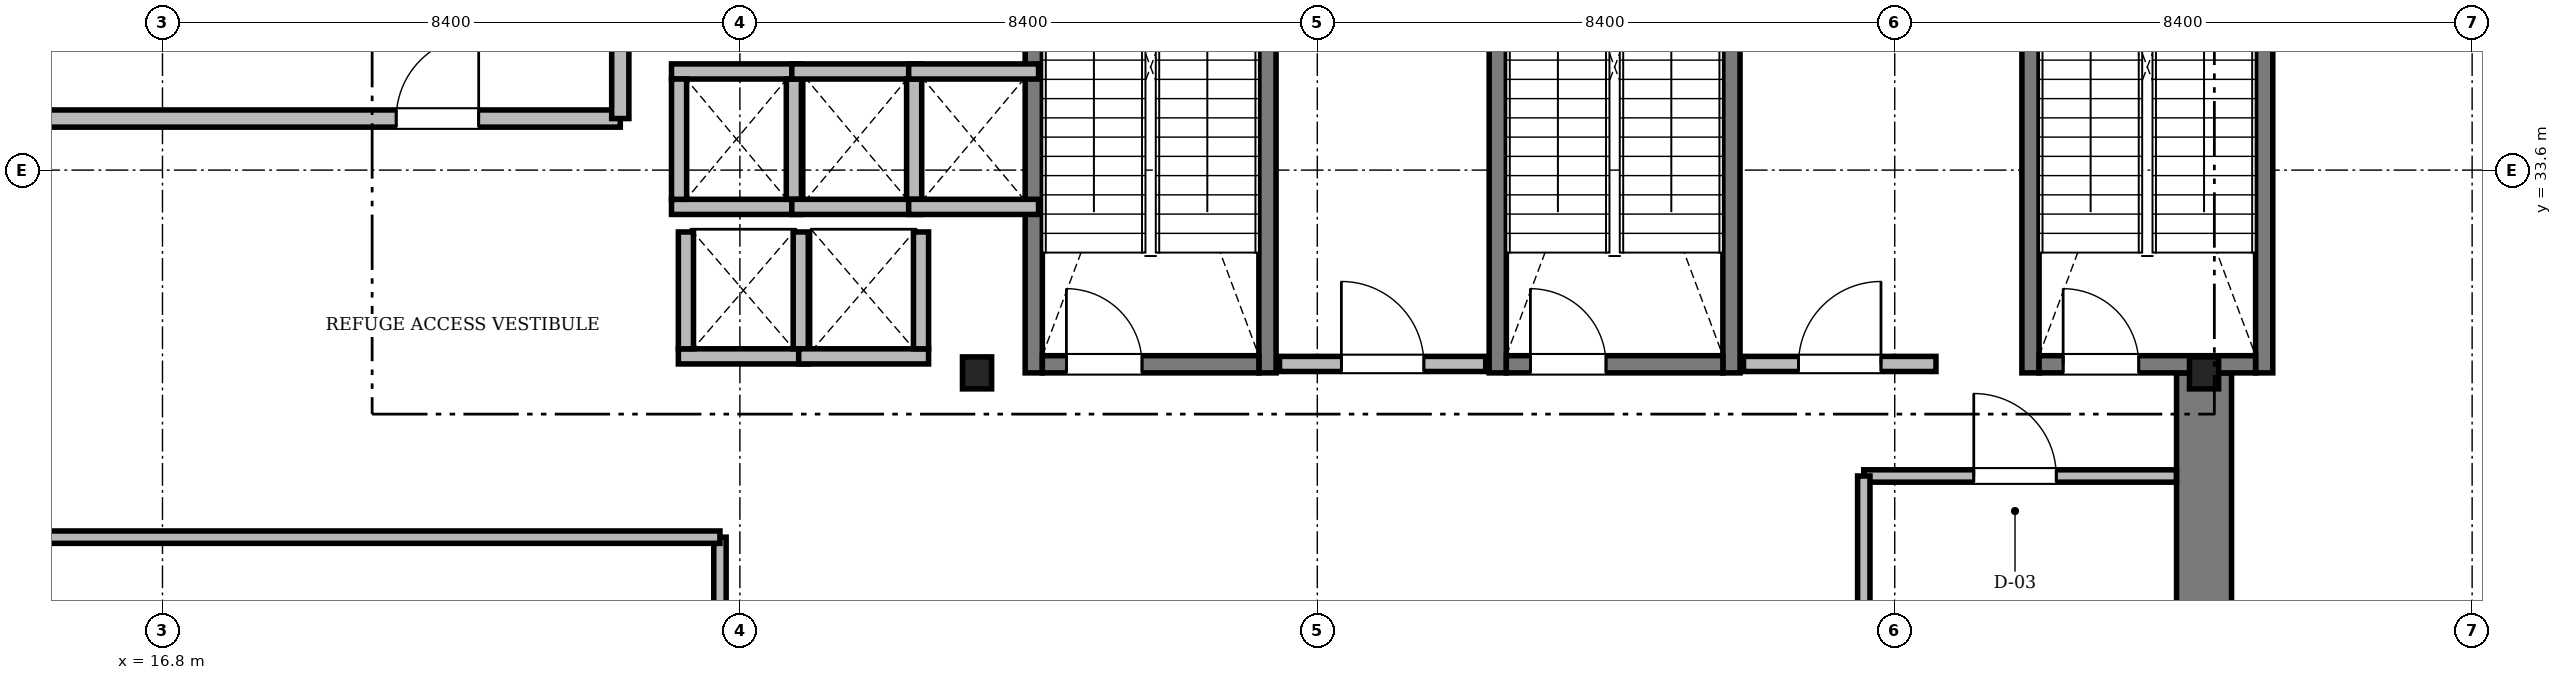
"""IFC4 building model, lengths in metres.
Left out: names, types, materials, properties, quantities, classifications, styles, units other than length and angle.
Written with IfcOpenShell. Run it as: python <this file> out.ifc"""

import sys

from ifc_helpers import new_model, si_unit, direction, frame, frame_2d, origin, origin_2d, place, context, subcontext, project, spatial, rectangle, i_section, extrude, source, transform, mapped, element, fill, save


model = new_model("IFC4")
c1 = context("Model", 3, precision=1e-05, world=origin(), true_north=direction((0.0, 1.0)))
c2 = subcontext(c1, "Body", "Model", "MODEL_VIEW")
j1 = project(units=[si_unit("LENGTHUNIT", "METRE"), si_unit("PLANEANGLEUNIT", "RADIAN")], contexts=[c1])
p1 = place(None, origin())
s1 = spatial("IfcSite", under=j1, at=p1, CompositionType="ELEMENT")
p2 = place(p1, origin())
s2 = spatial("IfcBuilding", under=s1, at=p2, CompositionType="ELEMENT")
p3 = place(p2, frame((0.0, 0.0, 166.8)))
s3 = spatial("IfcBuildingStorey", under=s2, at=p3, CompositionType="ELEMENT", Elevation=166.8)
m1 = source(origin(), c2, "Body", "SweptSolid", [
    extrude(rectangle(XDim=13.15, YDim=0.8, at=frame_2d((6.575, 0.0))), origin(), (0.0, 0.0, 1.0), 4.75),
])
p4 = place(p3, frame((46.5, 17.5, 0.0), z_axis=(0.0, 0.0, 1.0), x_axis=(0.0, 1.0, 0.0)))
e1 = element("IfcWall", 1, at=p4, inside=s3, PredefinedType="SHEAR", context=c2, shape_type="MappedRepresentation", body=[
    mapped(m1, transform((0.0, 0.0, 0.0), scale=1.0)),
])
m2 = source(origin(), c2, "Body", "SweptSolid", [
    extrude(i_section(OverallWidth=0.424, OverallDepth=0.465, WebThickness=0.035, FlangeThickness=0.056, FilletRadius=0.015, at=origin_2d()), origin(), (0.0, 0.0, 1.0), 4.75),
])
for number, where, z_axis, x_axis in (
    (2, (28.65, 30.65, 0.0), (0.0, 0.0, 1.0), (1.0, 0.0, 0.0)),
    (3, (46.5, 30.65, 0.0), (0.0, 0.0, 1.0), (1.0, 0.0, 0.0)),
):
    element("IfcColumn", number, at=place(p3, frame(where, z_axis=z_axis, x_axis=x_axis)), inside=s3, PredefinedType="COLUMN", context=c2, shape_type="MappedRepresentation", body=[
        mapped(m2, transform((0.0, 0.0, 0.0), scale=1.0)),
    ])
m3 = source(origin(), c2, "Body", "SweptSolid", [
    extrude(rectangle(XDim=9.25, YDim=0.25, at=frame_2d((4.625, 0.0))), origin(), (0.0, 0.0, 1.0), 5.2),
])
for number, where, z_axis, x_axis in (
    (4, (29.475, 30.65, 0.0), (0.0, 0.0, 1.0), (0.0, 1.0, 0.0)),
    (5, (32.875, 30.65, 0.0), (0.0, 0.0, 1.0), (0.0, 1.0, 0.0)),
):
    element("IfcWall", number, at=place(p3, frame(where, z_axis=z_axis, x_axis=x_axis)), inside=s3, PredefinedType="SOLIDWALL", context=c2, shape_type="MappedRepresentation", body=[
        mapped(m3, transform((0.0, 0.0, 0.0), scale=1.0)),
    ])
m4 = source(origin(), c2, "Body", "SweptSolid", [
    extrude(rectangle(XDim=3.15, YDim=0.25, at=frame_2d((1.575, 0.0))), origin(), (0.0, 0.0, 1.0), 5.2),
])
p5 = place(p3, frame((29.6, 30.775, 0.0), z_axis=(0.0, 0.0, 1.0), x_axis=(1.0, 0.0, 0.0)))
e6 = element("IfcWall", 6, at=p5, inside=s3, PredefinedType="SOLIDWALL", context=c2, shape_type="MappedRepresentation", body=[
    mapped(m4, transform((0.0, 0.0, 0.0), scale=1.0)),
])
m5 = source(origin(), c2, "Body", "SweptSolid", [
    extrude(rectangle(XDim=1.1, YDim=2.2, at=frame_2d((0.55, 1.1))), frame((0.0, 0.135, 0.0), z_axis=(0.0, -1.0, 0.0), x_axis=(1.0, 0.0, 0.0)), (0.0, 0.0, 1.0), 0.27),
])
p6 = place(p5, frame((0.35, 0.0, 0.0)))
e7 = element("IfcOpeningElement", 7, at=p6, cuts=e6, PredefinedType="OPENING", context=c2, shape_type="MappedRepresentation", body=[
    mapped(m5, transform((0.0, 0.0, 0.0), scale=1.0)),
])
for number, where, z_axis, x_axis in (
    (8, (36.225, 30.65, 0.0), (0.0, 0.0, 1.0), (0.0, 1.0, 0.0)),
    (9, (39.625, 30.65, 0.0), (0.0, 0.0, 1.0), (0.0, 1.0, 0.0)),
):
    element("IfcWall", number, at=place(p3, frame(where, z_axis=z_axis, x_axis=x_axis)), inside=s3, PredefinedType="SOLIDWALL", context=c2, shape_type="MappedRepresentation", body=[
        mapped(m3, transform((0.0, 0.0, 0.0), scale=1.0)),
    ])
p7 = place(p3, frame((36.35, 30.775, 0.0), z_axis=(0.0, 0.0, 1.0), x_axis=(1.0, 0.0, 0.0)))
e10 = element("IfcWall", 10, at=p7, inside=s3, PredefinedType="SOLIDWALL", context=c2, shape_type="MappedRepresentation", body=[
    mapped(m4, transform((0.0, 0.0, 0.0), scale=1.0)),
])
p8 = place(p7, frame((0.35, 0.0, 0.0)))
e11 = element("IfcOpeningElement", 11, at=p8, cuts=e10, PredefinedType="OPENING", context=c2, shape_type="MappedRepresentation", body=[
    mapped(m5, transform((0.0, 0.0, 0.0), scale=1.0)),
])
for number, where, z_axis, x_axis in (
    (12, (43.975, 30.65, 0.0), (0.0, 0.0, 1.0), (0.0, 1.0, 0.0)),
    (13, (47.375, 30.65, 0.0), (0.0, 0.0, 1.0), (0.0, 1.0, 0.0)),
):
    element("IfcWall", number, at=place(p3, frame(where, z_axis=z_axis, x_axis=x_axis)), inside=s3, PredefinedType="SOLIDWALL", context=c2, shape_type="MappedRepresentation", body=[
        mapped(m3, transform((0.0, 0.0, 0.0), scale=1.0)),
    ])
p9 = place(p3, frame((44.1, 30.775, 0.0), z_axis=(0.0, 0.0, 1.0), x_axis=(1.0, 0.0, 0.0)))
e14 = element("IfcWall", 14, at=p9, inside=s3, PredefinedType="SOLIDWALL", context=c2, shape_type="MappedRepresentation", body=[
    mapped(m4, transform((0.0, 0.0, 0.0), scale=1.0)),
])
p10 = place(p9, frame((0.35, 0.0, 0.0)))
e15 = element("IfcOpeningElement", 15, at=p10, cuts=e14, PredefinedType="OPENING", context=c2, shape_type="MappedRepresentation", body=[
    mapped(m5, transform((0.0, 0.0, 0.0), scale=1.0)),
])
m6 = source(origin(), c2, "Body", "SweptSolid", [
    extrude(rectangle(XDim=3.0, YDim=0.22, at=frame_2d((1.5, 0.0))), origin(), (0.0, 0.0, 1.0), 4.75),
])
p11 = place(p3, frame((33.05, 30.78, 0.0), z_axis=(0.0, 0.0, 1.0), x_axis=(1.0, 0.0, 0.0)))
e16 = element("IfcWall", 16, at=p11, inside=s3, PredefinedType="SOLIDWALL", context=c2, shape_type="MappedRepresentation", body=[
    mapped(m6, transform((0.0, 0.0, 0.0), scale=1.0)),
])
m7 = source(origin(), c2, "Body", "SweptSolid", [
    extrude(rectangle(XDim=1.2, YDim=2.2, at=frame_2d((0.6, 1.1))), frame((0.0, 0.12, 0.0), z_axis=(0.0, -1.0, 0.0), x_axis=(1.0, 0.0, 0.0)), (0.0, 0.0, 1.0), 0.24),
])
p12 = place(p11, frame((0.9, 0.0, 0.0)))
e17 = element("IfcOpeningElement", 17, at=p12, cuts=e16, PredefinedType="OPENING", context=c2, shape_type="MappedRepresentation", body=[
    mapped(m7, transform((0.0, 0.0, 0.0), scale=1.0)),
])
m8 = source(origin(), c2, "Body", "SweptSolid", [
    extrude(rectangle(XDim=2.8, YDim=0.22, at=frame_2d((1.4, 0.0))), origin(), (0.0, 0.0, 1.0), 4.75),
])
p13 = place(p3, frame((39.8, 30.78, 0.0), z_axis=(0.0, 0.0, 1.0), x_axis=(1.0, 0.0, 0.0)))
e18 = element("IfcWall", 18, at=p13, inside=s3, PredefinedType="SOLIDWALL", context=c2, shape_type="MappedRepresentation", body=[
    mapped(m8, transform((0.0, 0.0, 0.0), scale=1.0)),
])
p14 = place(p13, frame((0.8, 0.0, 0.0)))
e19 = element("IfcOpeningElement", 19, at=p14, cuts=e18, PredefinedType="OPENING", context=c2, shape_type="MappedRepresentation", body=[
    mapped(m7, transform((0.0, 0.0, 0.0), scale=1.0)),
])
m9 = source(origin(), c2, "Body", "SweptSolid", [
    extrude(rectangle(XDim=1.89, YDim=0.22, at=frame_2d((0.945, 0.0))), origin(), (0.0, 0.0, 1.0), 4.75),
])
for number, where, z_axis, x_axis in (
    (20, (24.205, 33.065, 0.0), (0.0, 0.0, 1.0), (1.0, 0.0, 0.0)),
    (21, (24.205, 35.035, 0.0), (0.0, 0.0, 1.0), (1.0, 0.0, 0.0)),
):
    element("IfcWall", number, at=place(p3, frame(where, z_axis=z_axis, x_axis=x_axis)), inside=s3, PredefinedType="SOLIDWALL", context=c2, shape_type="MappedRepresentation", body=[
        mapped(m9, transform((0.0, 0.0, 0.0), scale=1.0)),
    ])
m10 = source(origin(), c2, "Body", "SweptSolid", [
    extrude(rectangle(XDim=1.75, YDim=0.22, at=frame_2d((0.875, 0.0))), origin(), (0.0, 0.0, 1.0), 4.75),
])
for number, where, z_axis, x_axis in (
    (22, (24.315, 33.175, 0.0), (0.0, 0.0, 1.0), (0.0, 1.0, 0.0)),
    (23, (25.985, 33.175, 0.0), (0.0, 0.0, 1.0), (0.0, 1.0, 0.0)),
):
    element("IfcWall", number, at=place(p3, frame(where, z_axis=z_axis, x_axis=x_axis)), inside=s3, PredefinedType="SOLIDWALL", context=c2, shape_type="MappedRepresentation", body=[
        mapped(m10, transform((0.0, 0.0, 0.0), scale=1.0)),
    ])
for number, where, z_axis, x_axis in (
    (24, (25.955, 33.065, 0.0), (0.0, 0.0, 1.0), (1.0, 0.0, 0.0)),
    (25, (25.955, 35.035, 0.0), (0.0, 0.0, 1.0), (1.0, 0.0, 0.0)),
):
    element("IfcWall", number, at=place(p3, frame(where, z_axis=z_axis, x_axis=x_axis)), inside=s3, PredefinedType="SOLIDWALL", context=c2, shape_type="MappedRepresentation", body=[
        mapped(m9, transform((0.0, 0.0, 0.0), scale=1.0)),
    ])
p15 = place(p3, frame((27.735, 33.175, 0.0), z_axis=(0.0, 0.0, 1.0), x_axis=(0.0, 1.0, 0.0)))
e26 = element("IfcWall", 26, at=p15, inside=s3, PredefinedType="SOLIDWALL", context=c2, shape_type="MappedRepresentation", body=[
    mapped(m10, transform((0.0, 0.0, 0.0), scale=1.0)),
])
for number, where, z_axis, x_axis in (
    (27, (27.655, 33.065, 0.0), (0.0, 0.0, 1.0), (1.0, 0.0, 0.0)),
    (28, (27.655, 35.035, 0.0), (0.0, 0.0, 1.0), (1.0, 0.0, 0.0)),
):
    element("IfcWall", number, at=place(p3, frame(where, z_axis=z_axis, x_axis=x_axis)), inside=s3, PredefinedType="SOLIDWALL", context=c2, shape_type="MappedRepresentation", body=[
        mapped(m9, transform((0.0, 0.0, 0.0), scale=1.0)),
    ])
m11 = source(origin(), c2, "Body", "SweptSolid", [
    extrude(rectangle(XDim=1.89, YDim=0.22, at=frame_2d((0.945, 0.0))), origin(), (0.0, 0.0, 1.0), 4.75),
])
p16 = place(p3, frame((24.305, 30.89, 0.0), z_axis=(0.0, 0.0, 1.0), x_axis=(1.0, 0.0, 0.0)))
e29 = element("IfcWall", 29, at=p16, inside=s3, PredefinedType="SOLIDWALL", context=c2, shape_type="MappedRepresentation", body=[
    mapped(m11, transform((0.0, 0.0, 0.0), scale=1.0)),
])
m12 = source(origin(), c2, "Body", "SweptSolid", [
    extrude(rectangle(XDim=1.7, YDim=0.22, at=frame_2d((0.85, 0.0))), origin(), (0.0, 0.0, 1.0), 4.75),
])
for number, where, z_axis, x_axis in (
    (30, (24.415, 31.0, 0.0), (0.0, 0.0, 1.0), (0.0, 1.0, 0.0)),
    (31, (26.085, 31.0, 0.0), (0.0, 0.0, 1.0), (0.0, 1.0, 0.0)),
):
    element("IfcWall", number, at=place(p3, frame(where, z_axis=z_axis, x_axis=x_axis)), inside=s3, PredefinedType="SOLIDWALL", context=c2, shape_type="MappedRepresentation", body=[
        mapped(m12, transform((0.0, 0.0, 0.0), scale=1.0)),
    ])
p17 = place(p3, frame((26.055, 30.89, 0.0), z_axis=(0.0, 0.0, 1.0), x_axis=(1.0, 0.0, 0.0)))
e32 = element("IfcWall", 32, at=p17, inside=s3, PredefinedType="SOLIDWALL", context=c2, shape_type="MappedRepresentation", body=[
    mapped(m11, transform((0.0, 0.0, 0.0), scale=1.0)),
])
p18 = place(p3, frame((27.835, 31.0, 0.0), z_axis=(0.0, 0.0, 1.0), x_axis=(0.0, 1.0, 0.0)))
e33 = element("IfcWall", 33, at=p18, inside=s3, PredefinedType="SOLIDWALL", context=c2, shape_type="MappedRepresentation", body=[
    mapped(m12, transform((0.0, 0.0, 0.0), scale=1.0)),
])
m13 = source(origin(), c2, "Body", "SweptSolid", [
    extrude(rectangle(XDim=11.82, YDim=0.18, at=frame_2d((5.91, 0.0))), origin(), (0.0, 0.0, 1.0), 3.928),
])
p19 = place(p3, frame((24.91, 16.44, 0.0), z_axis=(0.0, 0.0, 1.0), x_axis=(0.0, 1.0, 0.0)))
e34 = element("IfcWall", 34, at=p19, inside=s3, PredefinedType="PARTITIONING", context=c2, shape_type="MappedRepresentation", body=[
    mapped(m13, transform((0.0, 0.0, 0.0), scale=1.0)),
])
m14 = source(origin(), c2, "Body", "SweptSolid", [
    extrude(rectangle(XDim=1.5, YDim=2.3, at=frame_2d((0.75, 1.15))), frame((0.0, 0.1, 0.0), z_axis=(0.0, -1.0, 0.0), x_axis=(1.0, 0.0, 0.0)), (0.0, 0.0, 1.0), 0.2),
])
p20 = place(p19, frame((4.5, 0.0, 0.0)))
e35 = element("IfcOpeningElement", 35, at=p20, cuts=e34, PredefinedType="OPENING", context=c2, shape_type="MappedRepresentation", body=[
    mapped(m14, transform((0.0, 0.0, 0.0), scale=1.0)),
])
m15 = source(origin(), c2, "Body", "SweptSolid", [
    extrude(rectangle(XDim=10.37, YDim=0.25, at=frame_2d((5.185, 0.0))), origin(), (0.0, 0.0, 1.0), 4.75),
])
p21 = place(p3, frame((13.09, 34.35, 0.0), z_axis=(0.0, 0.0, 1.0), x_axis=(1.0, 0.0, 0.0)))
e36 = element("IfcWall", 36, at=p21, inside=s3, PredefinedType="SOLIDWALL", context=c2, shape_type="MappedRepresentation", body=[
    mapped(m15, transform((0.0, 0.0, 0.0), scale=1.0)),
])
m16 = source(origin(), c2, "Body", "SweptSolid", [
    extrude(rectangle(XDim=1.2, YDim=2.2, at=frame_2d((0.6, 1.1))), frame((0.0, 0.135, 0.0), z_axis=(0.0, -1.0, 0.0), x_axis=(1.0, 0.0, 0.0)), (0.0, 0.0, 1.0), 0.27),
])
p22 = place(p21, frame((7.11, 0.0, 0.0)))
e37 = element("IfcOpeningElement", 37, at=p22, cuts=e36, PredefinedType="OPENING", context=c2, shape_type="MappedRepresentation", body=[
    mapped(m16, transform((0.0, 0.0, 0.0), scale=1.0)),
])
m17 = source(origin(), c2, "Body", "SweptSolid", [
    extrude(rectangle(XDim=4.548, YDim=0.18, at=frame_2d((2.274, 0.0))), origin(), (0.0, 0.0, 1.0), 4.382),
])
p23 = place(p3, frame((41.55, 29.15, 0.0), z_axis=(0.0, 0.0, 1.0), x_axis=(1.0, 0.0, 0.0)))
e38 = element("IfcWall", 38, at=p23, inside=s3, PredefinedType="PARTITIONING", context=c2, shape_type="MappedRepresentation", body=[
    mapped(m17, transform((0.0, 0.0, 0.0), scale=1.0)),
])
m18 = source(origin(), c2, "Body", "SweptSolid", [
    extrude(rectangle(XDim=1.2, YDim=2.2, at=frame_2d((0.6, 1.1))), frame((0.0, 0.1, 0.0), z_axis=(0.0, -1.0, 0.0), x_axis=(1.0, 0.0, 0.0)), (0.0, 0.0, 1.0), 0.2),
])
p24 = place(p23, frame((1.6, 0.0, 0.0)))
e39 = element("IfcOpeningElement", 39, at=p24, cuts=e38, PredefinedType="OPENING", context=c2, shape_type="MappedRepresentation", body=[
    mapped(m18, transform((0.0, 0.0, 0.0), scale=1.0)),
])
m19 = source(origin(), c2, "Body", "SweptSolid", [
    extrude(rectangle(XDim=13.82, YDim=0.18, at=frame_2d((6.91, 0.0))), origin(), (0.0, 0.0, 1.0), 3.928),
])
p25 = place(p3, frame((11.09, 28.26, 0.0), z_axis=(0.0, 0.0, 1.0), x_axis=(1.0, 0.0, 0.0)))
e40 = element("IfcWall", 40, at=p25, inside=s3, PredefinedType="PARTITIONING", context=c2, shape_type="MappedRepresentation", body=[
    mapped(m19, transform((0.0, 0.0, 0.0), scale=1.0)),
])
m20 = source(origin(), c2, "Body", "SweptSolid", [
    extrude(rectangle(XDim=9.86, YDim=0.25, at=frame_2d((4.93, 0.0))), origin(), (0.0, 0.0, 1.0), 4.75),
])
p26 = place(p3, frame((23.46, 34.35, 0.0), z_axis=(0.0, 0.0, 1.0), x_axis=(0.0, 1.0, 0.0)))
e41 = element("IfcWall", 41, at=p26, inside=s3, PredefinedType="SOLIDWALL", context=c2, shape_type="MappedRepresentation", body=[
    mapped(m20, transform((0.0, 0.0, 0.0), scale=1.0)),
])
m21 = source(origin(), c2, "Body", "SweptSolid", [
    extrude(rectangle(XDim=2.35, YDim=0.18, at=frame_2d((1.175, 0.0))), origin(), (0.0, 0.0, 1.0), 4.382),
])
p27 = place(p3, frame((41.55, 26.8, 0.0), z_axis=(0.0, 0.0, 1.0), x_axis=(0.0, 1.0, 0.0)))
e42 = element("IfcWall", 42, at=p27, inside=s3, PredefinedType="PARTITIONING", context=c2, shape_type="MappedRepresentation", body=[
    mapped(m21, transform((0.0, 0.0, 0.0), scale=1.0)),
])
m22 = source(origin(), c2, "Body", "SweptSolid", [
    extrude(rectangle(XDim=1.1, YDim=2.2, at=frame_2d((0.55, 1.1))), frame((0.0, 0.025, 0.0), z_axis=(0.0, -1.0, 0.0), x_axis=(1.0, 0.0, 0.0)), (0.0, 0.0, 1.0), 0.05),
])
p28 = place(p6, origin())
e43 = element("IfcDoor", 43, at=p28, inside=s3, OperationType="SINGLE_SWING_LEFT", PredefinedType="DOOR", context=c2, shape_type="MappedRepresentation", body=[
    mapped(m22, transform((0.0, 0.0, 0.0), scale=1.0)),
])
fill(e7, e43)
p29 = place(p8, origin())
e44 = element("IfcDoor", 44, at=p29, inside=s3, OperationType="SINGLE_SWING_LEFT", PredefinedType="DOOR", context=c2, shape_type="MappedRepresentation", body=[
    mapped(m22, transform((0.0, 0.0, 0.0), scale=1.0)),
])
fill(e11, e44)
p30 = place(p10, origin())
e45 = element("IfcDoor", 45, at=p30, inside=s3, OperationType="SINGLE_SWING_LEFT", PredefinedType="DOOR", context=c2, shape_type="MappedRepresentation", body=[
    mapped(m22, transform((0.0, 0.0, 0.0), scale=1.0)),
])
fill(e15, e45)
m23 = source(origin(), c2, "Body", "SweptSolid", [
    extrude(rectangle(XDim=1.2, YDim=2.2, at=frame_2d((0.6, 1.1))), frame((0.0, 0.025, 0.0), z_axis=(0.0, -1.0, 0.0), x_axis=(1.0, 0.0, 0.0)), (0.0, 0.0, 1.0), 0.05),
])
p31 = place(p12, origin())
e46 = element("IfcDoor", 46, at=p31, inside=s3, OperationType="SINGLE_SWING_LEFT", PredefinedType="DOOR", context=c2, shape_type="MappedRepresentation", body=[
    mapped(m23, transform((0.0, 0.0, 0.0), scale=1.0)),
])
fill(e17, e46)
p32 = place(p14, origin())
e47 = element("IfcDoor", 47, at=p32, inside=s3, OperationType="SINGLE_SWING_RIGHT", PredefinedType="DOOR", context=c2, shape_type="MappedRepresentation", body=[
    mapped(m23, transform((0.0, 0.0, 0.0), scale=1.0)),
])
fill(e19, e47)
p33 = place(p22, origin())
e48 = element("IfcDoor", 48, at=p33, inside=s3, OperationType="SINGLE_SWING_RIGHT", PredefinedType="DOOR", context=c2, shape_type="MappedRepresentation", body=[
    mapped(m23, transform((0.0, 0.0, 0.0), scale=1.0)),
])
fill(e37, e48)
p34 = place(p24, origin())
e49 = element("IfcDoor", 49, at=p34, inside=s3, OperationType="SINGLE_SWING_LEFT", PredefinedType="DOOR", context=c2, shape_type="MappedRepresentation", body=[
    mapped(m23, transform((0.0, 0.0, 0.0), scale=1.0)),
])
fill(e39, e49)
save(model, sys.argv[1])
